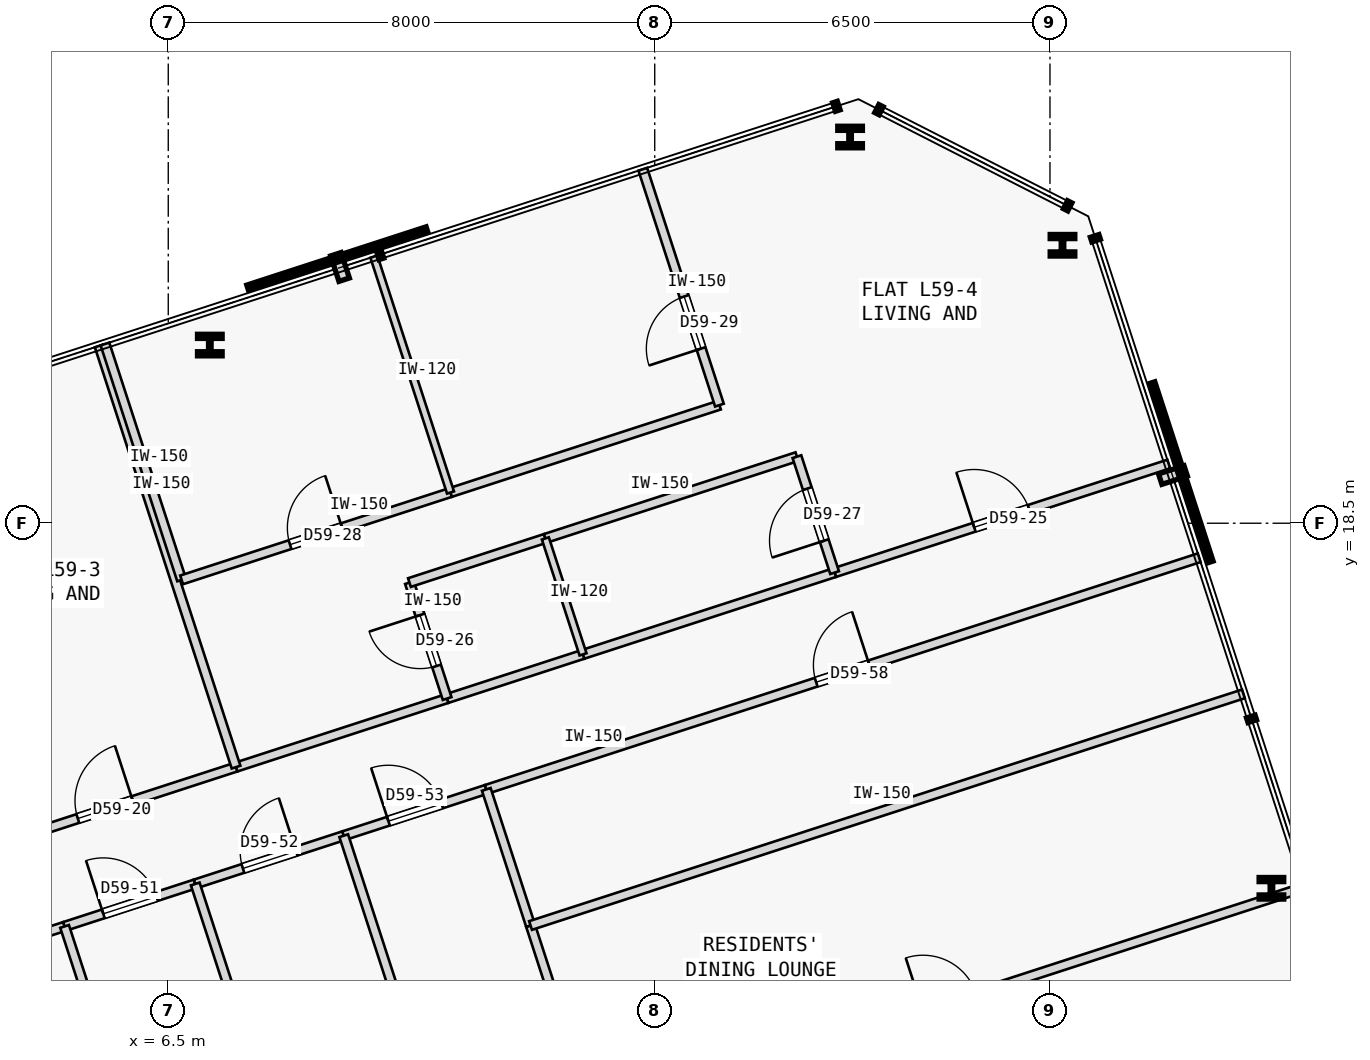
"""IFC4 building model, lengths in metres.
Left out: names, types, materials, properties, quantities, classifications, styles, units other than length and angle.
Written with IfcOpenShell. Run it as: python <this file> out.ifc"""

import sys

from ifc_helpers import new_model, si_unit, direction, frame, frame_2d, origin, origin_2d, place, context, subcontext, project, spatial, rectangle, i_section, extrude, element, fill, save


model = new_model("IFC4")
c1 = context("Model", 3, precision=1e-05, world=origin(), true_north=direction((0.0, 1.0)))
c2 = subcontext(c1, "Body", "Model", "MODEL_VIEW")
j1 = project(units=[si_unit("LENGTHUNIT", "METRE"), si_unit("PLANEANGLEUNIT", "RADIAN")], contexts=[c1])
p1 = place(None, origin())
s1 = spatial("IfcSite", under=j1, at=p1, CompositionType="ELEMENT")
p2 = place(p1, origin())
s2 = spatial("IfcBuilding", under=s1, at=p2, CompositionType="ELEMENT")
p3 = place(p2, frame((0.0, 0.0, 224.3)))
s3 = spatial("IfcBuildingStorey", under=s2, at=p3, CompositionType="ELEMENT", Elevation=224.3)
for number, where, z_axis, x_axis in (
    (1, (24.642, 12.497, 0.0), (0.0, 0.0, 1.0), (1.0, 0.0, 0.0)),
    (2, (21.206, 23.071, 0.0), (0.0, 0.0, 1.0), (1.0, 0.0, 0.0)),
    (3, (17.713, 24.851, 0.0), (0.0, 0.0, 1.0), (1.0, 0.0, 0.0)),
    (4, (7.184, 21.43, 0.0), (0.0, 0.0, 1.0), (1.0, 0.0, 0.0)),
):
    element("IfcColumn", number, at=place(p3, frame(where, z_axis=z_axis, x_axis=x_axis)), inside=s3, PredefinedType="COLUMN", context=c2, shape_type="SweptSolid", body=[
        extrude(i_section(OverallWidth=0.405, OverallDepth=0.355, WebThickness=0.042, FlangeThickness=0.068, FilletRadius=0.015, at=origin_2d()), origin(), (0.0, 0.0, 1.0), 3.35),
    ])
p4 = place(p3, frame((3.314, 13.092, 0.0), z_axis=(0.0, 0.0, 1.0), x_axis=(0.951068976929, 0.308978641858, 0.0)))
e5 = element("IfcWall", 5, at=p4, inside=s3, PredefinedType="PARTITIONING", context=c2, shape_type="SweptSolid", body=[
    extrude(rectangle(XDim=4.522, YDim=0.15, at=frame_2d((2.261, 0.0))), origin(), (0.0, 0.0, 1.0), 3.125),
])
p5 = place(p4, frame((1.786, 0.0, 0.0)))
e6 = element("IfcOpeningElement", 6, at=p5, cuts=e5, PredefinedType="OPENING", context=c2, shape_type="SweptSolid", body=[
    extrude(rectangle(XDim=0.95, YDim=2.15, at=frame_2d((0.475, 1.075))), frame((0.0, 0.085, 0.0), z_axis=(0.0, -1.0, 0.0), x_axis=(1.0, 0.0, 0.0)), (0.0, 0.0, 1.0), 0.17),
])
p6 = place(p3, frame((7.615, 14.489, 0.0), z_axis=(0.0, 0.0, 1.0), x_axis=(0.951050780541, 0.309034646652, 0.0)))
e7 = element("IfcWall", 7, at=p6, inside=s3, PredefinedType="PARTITIONING", context=c2, shape_type="SweptSolid", body=[
    extrude(rectangle(XDim=3.65, YDim=0.15, at=frame_2d((1.825, 0.0))), origin(), (0.0, 0.0, 1.0), 3.125),
])
p7 = place(p3, frame((17.458, 17.688, 0.0), z_axis=(0.0, 0.0, 1.0), x_axis=(0.951064183239, 0.308993396953, 0.0)))
e8 = element("IfcWall", 8, at=p7, inside=s3, PredefinedType="PARTITIONING", context=c2, shape_type="SweptSolid", body=[
    extrude(rectangle(XDim=5.778, YDim=0.15, at=frame_2d((2.889, 0.0))), origin(), (0.0, 0.0, 1.0), 3.125),
])
p8 = place(p7, frame((2.414, 0.0, 0.0)))
e9 = element("IfcOpeningElement", 9, at=p8, cuts=e8, PredefinedType="OPENING", context=c2, shape_type="SweptSolid", body=[
    extrude(rectangle(XDim=0.95, YDim=2.15, at=frame_2d((0.475, 1.075))), frame((0.0, 0.085, 0.0), z_axis=(0.0, -1.0, 0.0), x_axis=(1.0, 0.0, 0.0)), (0.0, 0.0, 1.0), 0.17),
])
p9 = place(p3, frame((11.086, 15.617, 0.0), z_axis=(0.0, 0.0, 1.0), x_axis=(0.951045519245, 0.309050837767, 0.0)))
e10 = element("IfcWall", 10, at=p9, inside=s3, PredefinedType="PARTITIONING", context=c2, shape_type="SweptSolid", body=[
    extrude(rectangle(XDim=2.35, YDim=0.15, at=frame_2d((1.175, 0.0))), origin(), (0.0, 0.0, 1.0), 3.125),
])
p10 = place(p3, frame((13.321, 16.344, 0.0), z_axis=(0.0, 0.0, 1.0), x_axis=(0.951052627573, 0.309028962374, 0.0)))
e11 = element("IfcWall", 11, at=p10, inside=s3, PredefinedType="PARTITIONING", context=c2, shape_type="SweptSolid", body=[
    extrude(rectangle(XDim=4.35, YDim=0.15, at=frame_2d((2.175, 0.0))), origin(), (0.0, 0.0, 1.0), 3.125),
])
p11 = place(p3, frame((3.699, 11.514, 0.0), z_axis=(0.0, 0.0, 1.0), x_axis=(0.951071437281, 0.308971068529, 0.0)))
e12 = element("IfcWall", 12, at=p11, inside=s3, PredefinedType="PARTITIONING", context=c2, shape_type="SweptSolid", body=[
    extrude(rectangle(XDim=1.152, YDim=0.15, at=frame_2d((0.576, 0.0))), origin(), (0.0, 0.0, 1.0), 3.125),
])
p12 = place(p3, frame((4.795, 11.87, 0.0), z_axis=(0.0, 0.0, 1.0), x_axis=(0.951065832698, 0.308988319964, 0.0)))
e13 = element("IfcWall", 13, at=p12, inside=s3, PredefinedType="PARTITIONING", context=c2, shape_type="SweptSolid", body=[
    extrude(rectangle(XDim=2.259, YDim=0.15, at=frame_2d((1.129, 0.0))), origin(), (0.0, 0.0, 1.0), 3.125),
])
p13 = place(p12, frame((0.669, 0.0, 0.0)))
e14 = element("IfcOpeningElement", 14, at=p13, cuts=e13, PredefinedType="OPENING", context=c2, shape_type="SweptSolid", body=[
    extrude(rectangle(XDim=0.92, YDim=2.15, at=frame_2d((0.46, 1.075))), frame((0.0, 0.085, 0.0), z_axis=(0.0, -1.0, 0.0), x_axis=(1.0, 0.0, 0.0)), (0.0, 0.0, 1.0), 0.17),
])
p14 = place(p3, frame((6.944, 12.568, 0.0), z_axis=(0.0, 0.0, 1.0), x_axis=(0.951042451835, 0.309060276981, 0.0)))
e15 = element("IfcWall", 15, at=p14, inside=s3, PredefinedType="PARTITIONING", context=c2, shape_type="SweptSolid", body=[
    extrude(rectangle(XDim=2.568, YDim=0.15, at=frame_2d((1.284, 0.0))), origin(), (0.0, 0.0, 1.0), 3.125),
])
p15 = place(p14, frame((0.824, 0.0, 0.0)))
e16 = element("IfcOpeningElement", 16, at=p15, cuts=e15, PredefinedType="OPENING", context=c2, shape_type="SweptSolid", body=[
    extrude(rectangle(XDim=0.92, YDim=2.15, at=frame_2d((0.46, 1.075))), frame((0.0, 0.085, 0.0), z_axis=(0.0, -1.0, 0.0), x_axis=(1.0, 0.0, 0.0)), (0.0, 0.0, 1.0), 0.17),
])
p16 = place(p3, frame((9.386, 13.362, 0.0), z_axis=(0.0, 0.0, 1.0), x_axis=(0.951052991774, 0.309027841526, 0.0)))
e17 = element("IfcWall", 17, at=p16, inside=s3, PredefinedType="PARTITIONING", context=c2, shape_type="SweptSolid", body=[
    extrude(rectangle(XDim=2.465, YDim=0.15, at=frame_2d((1.232, 0.0))), origin(), (0.0, 0.0, 1.0), 3.125),
])
p17 = place(p16, frame((0.772, 0.0, 0.0)))
e18 = element("IfcOpeningElement", 18, at=p17, cuts=e17, PredefinedType="OPENING", context=c2, shape_type="SweptSolid", body=[
    extrude(rectangle(XDim=0.92, YDim=2.15, at=frame_2d((0.46, 1.075))), frame((0.0, 0.085, 0.0), z_axis=(0.0, -1.0, 0.0), x_axis=(1.0, 0.0, 0.0)), (0.0, 0.0, 1.0), 0.17),
])
p18 = place(p3, frame((11.73, 14.123, 0.0), z_axis=(0.0, 0.0, 1.0), x_axis=(0.951060263663, 0.309005460926, 0.0)))
e19 = element("IfcWall", 19, at=p18, inside=s3, PredefinedType="PARTITIONING", context=c2, shape_type="SweptSolid", body=[
    extrude(rectangle(XDim=12.327, YDim=0.15, at=frame_2d((6.164, 0.0))), origin(), (0.0, 0.0, 1.0), 3.125),
])
p19 = place(p18, frame((5.704, 0.0, 0.0)))
e20 = element("IfcOpeningElement", 20, at=p19, cuts=e19, PredefinedType="OPENING", context=c2, shape_type="SweptSolid", body=[
    extrude(rectangle(XDim=0.92, YDim=2.15, at=frame_2d((0.46, 1.075))), frame((0.0, 0.085, 0.0), z_axis=(0.0, -1.0, 0.0), x_axis=(1.0, 0.0, 0.0)), (0.0, 0.0, 1.0), 0.17),
])
p20 = place(p3, frame((7.615, 14.489, 0.0), z_axis=(0.0, 0.0, 1.0), x_axis=(-0.309029230739, 0.951052540372, 0.0)))
e21 = element("IfcWall", 21, at=p20, inside=s3, PredefinedType="PARTITIONING", context=c2, shape_type="SweptSolid", body=[
    extrude(rectangle(XDim=7.284, YDim=0.15, at=frame_2d((3.642, 0.0))), origin(), (0.0, 0.0, 1.0), 3.125),
])
p21 = place(p3, frame((11.086, 15.617, 0.0), z_axis=(0.0, 0.0, 1.0), x_axis=(-0.309022749039, 0.951054646472, 0.0)))
e22 = element("IfcWall", 22, at=p21, inside=s3, PredefinedType="PARTITIONING", context=c2, shape_type="SweptSolid", body=[
    extrude(rectangle(XDim=2.005, YDim=0.15, at=frame_2d((1.002, 0.0))), origin(), (0.0, 0.0, 1.0), 3.125),
])
p22 = place(p21, frame((0.562, 0.0, 0.0)))
e23 = element("IfcOpeningElement", 23, at=p22, cuts=e22, PredefinedType="OPENING", context=c2, shape_type="SweptSolid", body=[
    extrude(rectangle(XDim=0.88, YDim=2.15, at=frame_2d((0.44, 1.075))), frame((0.0, 0.085, 0.0), z_axis=(0.0, -1.0, 0.0), x_axis=(1.0, 0.0, 0.0)), (0.0, 0.0, 1.0), 0.17),
])
p23 = place(p3, frame((10.466, 17.524, 0.0), z_axis=(0.0, 0.0, 1.0), x_axis=(0.951076048914, 0.308956872689, 0.0)))
e24 = element("IfcWall", 24, at=p23, inside=s3, PredefinedType="PARTITIONING", context=c2, shape_type="SweptSolid", body=[
    extrude(rectangle(XDim=2.35, YDim=0.15, at=frame_2d((1.175, 0.0))), origin(), (0.0, 0.0, 1.0), 3.125),
])
p24 = place(p3, frame((12.701, 18.25, 0.0), z_axis=(0.0, 0.0, 1.0), x_axis=(0.951052627573, 0.309028962374, 0.0)))
e25 = element("IfcWall", 25, at=p24, inside=s3, PredefinedType="PARTITIONING", context=c2, shape_type="SweptSolid", body=[
    extrude(rectangle(XDim=4.35, YDim=0.15, at=frame_2d((2.175, 0.0))), origin(), (0.0, 0.0, 1.0), 3.125),
])
p25 = place(p3, frame((17.458, 17.688, 0.0), z_axis=(0.0, 0.0, 1.0), x_axis=(-0.309058537449, 0.951043017129, 0.0)))
e26 = element("IfcWall", 26, at=p25, inside=s3, PredefinedType="PARTITIONING", context=c2, shape_type="SweptSolid", body=[
    extrude(rectangle(XDim=2.005, YDim=0.15, at=frame_2d((1.002, 0.0))), origin(), (0.0, 0.0, 1.0), 3.125),
])
p26 = place(p25, frame((0.552, 0.0, 0.0)))
e27 = element("IfcOpeningElement", 27, at=p26, cuts=e26, PredefinedType="OPENING", context=c2, shape_type="SweptSolid", body=[
    extrude(rectangle(XDim=0.9, YDim=2.15, at=frame_2d((0.45, 1.075))), frame((0.0, 0.085, 0.0), z_axis=(0.0, -1.0, 0.0), x_axis=(1.0, 0.0, 0.0)), (0.0, 0.0, 1.0), 0.17),
])
p27 = place(p3, frame((6.719, 17.568, 0.0), z_axis=(0.0, 0.0, 1.0), x_axis=(-0.309018403393, 0.951056058476, 0.0)))
e28 = element("IfcWall", 28, at=p27, inside=s3, PredefinedType="PARTITIONING", context=c2, shape_type="SweptSolid", body=[
    extrude(rectangle(XDim=4.079, YDim=0.15, at=frame_2d((2.04, 0.0))), origin(), (0.0, 0.0, 1.0), 3.125),
])
p28 = place(p3, frame((6.719, 17.568, 0.0), z_axis=(0.0, 0.0, 1.0), x_axis=(0.951050272606, 0.309036209813, 0.0)))
e29 = element("IfcWall", 29, at=p28, inside=s3, PredefinedType="PARTITIONING", context=c2, shape_type="SweptSolid", body=[
    extrude(rectangle(XDim=4.65, YDim=0.15, at=frame_2d((2.325, 0.0))), origin(), (0.0, 0.0, 1.0), 3.125),
])
p29 = place(p28, frame((1.875, 0.0, 0.0)))
e30 = element("IfcOpeningElement", 30, at=p29, cuts=e29, PredefinedType="OPENING", context=c2, shape_type="SweptSolid", body=[
    extrude(rectangle(XDim=0.9, YDim=2.15, at=frame_2d((0.45, 1.075))), frame((0.0, 0.085, 0.0), z_axis=(0.0, -1.0, 0.0), x_axis=(1.0, 0.0, 0.0)), (0.0, 0.0, 1.0), 0.17),
])
p30 = place(p3, frame((11.142, 19.005, 0.0), z_axis=(0.0, 0.0, 1.0), x_axis=(0.951065702951, 0.308988719326, 0.0)))
e31 = element("IfcWall", 31, at=p30, inside=s3, PredefinedType="PARTITIONING", context=c2, shape_type="SweptSolid", body=[
    extrude(rectangle(XDim=4.65, YDim=0.15, at=frame_2d((2.325, 0.0))), origin(), (0.0, 0.0, 1.0), 3.125),
])
p31 = place(p3, frame((15.564, 20.442, 0.0), z_axis=(0.0, 0.0, 1.0), x_axis=(-0.309018403393, 0.951056058476, 0.0)))
e32 = element("IfcWall", 32, at=p31, inside=s3, PredefinedType="PARTITIONING", context=c2, shape_type="SweptSolid", body=[
    extrude(rectangle(XDim=4.079, YDim=0.15, at=frame_2d((2.04, 0.0))), origin(), (0.0, 0.0, 1.0), 3.125),
])
p32 = place(p31, frame((0.978, 0.0, 0.0)))
e33 = element("IfcOpeningElement", 33, at=p32, cuts=e32, PredefinedType="OPENING", context=c2, shape_type="SweptSolid", body=[
    extrude(rectangle(XDim=0.9, YDim=2.15, at=frame_2d((0.45, 1.075))), frame((0.0, 0.085, 0.0), z_axis=(0.0, -1.0, 0.0), x_axis=(1.0, 0.0, 0.0)), (0.0, 0.0, 1.0), 0.17),
])
p33 = place(p3, frame((13.321, 16.344, 0.0), z_axis=(0.0, 0.0, 1.0), x_axis=(-0.309058537449, 0.951043017129, 0.0)))
e34 = element("IfcWall", 34, at=p33, inside=s3, PredefinedType="PARTITIONING", context=c2, shape_type="SweptSolid", body=[
    extrude(rectangle(XDim=2.005, YDim=0.12, at=frame_2d((1.002, 0.0))), origin(), (0.0, 0.0, 1.0), 3.125),
])
p34 = place(p3, frame((11.142, 19.005, 0.0), z_axis=(0.0, 0.0, 1.0), x_axis=(-0.309018403393, 0.951056058476, 0.0)))
e35 = element("IfcWall", 35, at=p34, inside=s3, PredefinedType="PARTITIONING", context=c2, shape_type="SweptSolid", body=[
    extrude(rectangle(XDim=4.079, YDim=0.12, at=frame_2d((2.04, 0.0))), origin(), (0.0, 0.0, 1.0), 3.125),
])
p35 = place(p3, frame((6.833, 5.6, 0.0), z_axis=(0.0, 0.0, 1.0), x_axis=(-0.309019923183, 0.951055564663, 0.0)))
e36 = element("IfcWall", 36, at=p35, inside=s3, PredefinedType="PARTITIONING", context=c2, shape_type="SweptSolid", body=[
    extrude(rectangle(XDim=6.593, YDim=0.15, at=frame_2d((3.296, 0.0))), origin(), (0.0, 0.0, 1.0), 2.675),
])
p36 = place(p3, frame((9.208, 5.6, 0.0), z_axis=(0.0, 0.0, 1.0), x_axis=(-0.309021275068, 0.951055125403, 0.0)))
e37 = element("IfcWall", 37, at=p36, inside=s3, PredefinedType="PARTITIONING", context=c2, shape_type="SweptSolid", body=[
    extrude(rectangle(XDim=7.327, YDim=0.15, at=frame_2d((3.664, 0.0))), origin(), (0.0, 0.0, 1.0), 3.125),
])
p37 = place(p3, frame((11.908, 5.6, 0.0), z_axis=(0.0, 0.0, 1.0), x_axis=(-0.308994076163, 0.951063962568, 0.0)))
e38 = element("IfcWall", 38, at=p37, inside=s3, PredefinedType="PARTITIONING", context=c2, shape_type="SweptSolid", body=[
    extrude(rectangle(XDim=8.161, YDim=0.15, at=frame_2d((4.081, 0.0))), origin(), (0.0, 0.0, 1.0), 3.125),
])
p38 = place(p3, frame((13.488, 8.714, 0.0), z_axis=(0.0, 0.0, 1.0), x_axis=(-0.308946982245, 0.951079261766, 0.0)))
e39 = element("IfcWall", 39, at=p38, inside=s3, PredefinedType="PARTITIONING", context=c2, shape_type="SweptSolid", body=[
    extrude(rectangle(XDim=3.334, YDim=0.15, at=frame_2d((1.667, 0.0))), origin(), (0.0, 0.0, 1.0), 3.125),
])
p39 = place(p3, frame((12.458, 11.885, 0.0), z_axis=(0.0, 0.0, 1.0), x_axis=(-0.309062621189, 0.951041690035, 0.0)))
e40 = element("IfcWall", 40, at=p39, inside=s3, PredefinedType="PARTITIONING", context=c2, shape_type="SweptSolid", body=[
    extrude(rectangle(XDim=2.354, YDim=0.15, at=frame_2d((1.177, 0.0))), origin(), (0.0, 0.0, 1.0), 3.125),
])
p40 = place(p3, frame((13.488, 8.714, 0.0), z_axis=(0.0, 0.0, 1.0), x_axis=(0.951062154725, 0.308999640533, 0.0)))
e41 = element("IfcWall", 41, at=p40, inside=s3, PredefinedType="PARTITIONING", context=c2, shape_type="SweptSolid", body=[
    extrude(rectangle(XDim=12.327, YDim=0.15, at=frame_2d((6.164, 0.0))), origin(), (0.0, 0.0, 1.0), 3.125),
])
p41 = place(p40, frame((5.704, 0.0, 0.0)))
e42 = element("IfcOpeningElement", 42, at=p41, cuts=e41, PredefinedType="OPENING", context=c2, shape_type="SweptSolid", body=[
    extrude(rectangle(XDim=0.92, YDim=2.15, at=frame_2d((0.46, 1.075))), frame((0.0, 0.085, 0.0), z_axis=(0.0, -1.0, 0.0), x_axis=(1.0, 0.0, 0.0)), (0.0, 0.0, 1.0), 0.17),
])
p42 = place(p3, frame((12.458, 11.885, 0.0), z_axis=(0.0, 0.0, 1.0), x_axis=(0.951060263663, 0.309005460926, 0.0)))
e43 = element("IfcWall", 43, at=p42, inside=s3, PredefinedType="PARTITIONING", context=c2, shape_type="SweptSolid", body=[
    extrude(rectangle(XDim=12.327, YDim=0.15, at=frame_2d((6.164, 0.0))), origin(), (0.0, 0.0, 1.0), 3.125),
])
p43 = place(p5, origin())
e44 = element("IfcDoor", 44, at=p43, inside=s3, OperationType="SINGLE_SWING_RIGHT", PredefinedType="DOOR", context=c2, shape_type="SweptSolid", body=[
    extrude(rectangle(XDim=0.95, YDim=2.15, at=frame_2d((0.475, 1.075))), frame((0.0, 0.025, 0.0), z_axis=(0.0, -1.0, 0.0), x_axis=(1.0, 0.0, 0.0)), (0.0, 0.0, 1.0), 0.05),
])
fill(e6, e44)
p44 = place(p8, origin())
e45 = element("IfcDoor", 45, at=p44, inside=s3, OperationType="SINGLE_SWING_LEFT", PredefinedType="DOOR", context=c2, shape_type="SweptSolid", body=[
    extrude(rectangle(XDim=0.95, YDim=2.15, at=frame_2d((0.475, 1.075))), frame((0.0, 0.025, 0.0), z_axis=(0.0, -1.0, 0.0), x_axis=(1.0, 0.0, 0.0)), (0.0, 0.0, 1.0), 0.05),
])
fill(e9, e45)
p45 = place(p22, origin())
e46 = element("IfcDoor", 46, at=p45, inside=s3, OperationType="SINGLE_SWING_RIGHT", PredefinedType="DOOR", context=c2, shape_type="SweptSolid", body=[
    extrude(rectangle(XDim=0.88, YDim=2.15, at=frame_2d((0.44, 1.075))), frame((0.0, 0.025, 0.0), z_axis=(0.0, -1.0, 0.0), x_axis=(1.0, 0.0, 0.0)), (0.0, 0.0, 1.0), 0.05),
])
fill(e23, e46)
p46 = place(p26, origin())
e47 = element("IfcDoor", 47, at=p46, inside=s3, OperationType="SINGLE_SWING_LEFT", PredefinedType="DOOR", context=c2, shape_type="SweptSolid", body=[
    extrude(rectangle(XDim=0.9, YDim=2.15, at=frame_2d((0.45, 1.075))), frame((0.0, 0.025, 0.0), z_axis=(0.0, -1.0, 0.0), x_axis=(1.0, 0.0, 0.0)), (0.0, 0.0, 1.0), 0.05),
])
fill(e27, e47)
p47 = place(p29, origin())
e48 = element("IfcDoor", 48, at=p47, inside=s3, OperationType="SINGLE_SWING_RIGHT", PredefinedType="DOOR", context=c2, shape_type="SweptSolid", body=[
    extrude(rectangle(XDim=0.9, YDim=2.15, at=frame_2d((0.45, 1.075))), frame((0.0, 0.025, 0.0), z_axis=(0.0, -1.0, 0.0), x_axis=(1.0, 0.0, 0.0)), (0.0, 0.0, 1.0), 0.05),
])
fill(e30, e48)
p48 = place(p32, origin())
e49 = element("IfcDoor", 49, at=p48, inside=s3, OperationType="SINGLE_SWING_LEFT", PredefinedType="DOOR", context=c2, shape_type="SweptSolid", body=[
    extrude(rectangle(XDim=0.9, YDim=2.15, at=frame_2d((0.45, 1.075))), frame((0.0, 0.025, 0.0), z_axis=(0.0, -1.0, 0.0), x_axis=(1.0, 0.0, 0.0)), (0.0, 0.0, 1.0), 0.05),
])
fill(e33, e49)
p49 = place(p13, origin())
e50 = element("IfcDoor", 50, at=p49, inside=s3, OperationType="SINGLE_SWING_LEFT", PredefinedType="DOOR", context=c2, shape_type="SweptSolid", body=[
    extrude(rectangle(XDim=0.92, YDim=2.15, at=frame_2d((0.46, 1.075))), frame((0.0, 0.025, 0.0), z_axis=(0.0, -1.0, 0.0), x_axis=(1.0, 0.0, 0.0)), (0.0, 0.0, 1.0), 0.05),
])
fill(e14, e50)
p50 = place(p15, origin())
e51 = element("IfcDoor", 51, at=p50, inside=s3, OperationType="SINGLE_SWING_RIGHT", PredefinedType="DOOR", context=c2, shape_type="SweptSolid", body=[
    extrude(rectangle(XDim=0.92, YDim=2.15, at=frame_2d((0.46, 1.075))), frame((0.0, 0.025, 0.0), z_axis=(0.0, -1.0, 0.0), x_axis=(1.0, 0.0, 0.0)), (0.0, 0.0, 1.0), 0.05),
])
fill(e16, e51)
p51 = place(p17, origin())
e52 = element("IfcDoor", 52, at=p51, inside=s3, OperationType="SINGLE_SWING_LEFT", PredefinedType="DOOR", context=c2, shape_type="SweptSolid", body=[
    extrude(rectangle(XDim=0.92, YDim=2.15, at=frame_2d((0.46, 1.075))), frame((0.0, 0.025, 0.0), z_axis=(0.0, -1.0, 0.0), x_axis=(1.0, 0.0, 0.0)), (0.0, 0.0, 1.0), 0.05),
])
fill(e18, e52)
p52 = place(p19, origin())
e53 = element("IfcDoor", 53, at=p52, inside=s3, OperationType="SINGLE_SWING_RIGHT", PredefinedType="DOOR", context=c2, shape_type="SweptSolid", body=[
    extrude(rectangle(XDim=0.92, YDim=2.15, at=frame_2d((0.46, 1.075))), frame((0.0, 0.025, 0.0), z_axis=(0.0, -1.0, 0.0), x_axis=(1.0, 0.0, 0.0)), (0.0, 0.0, 1.0), 0.05),
])
fill(e20, e53)
save(model, sys.argv[1])
